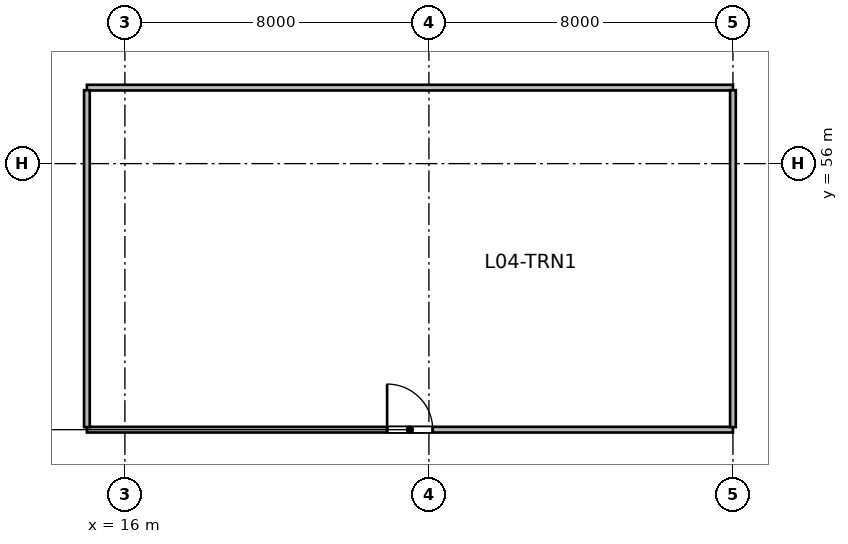
"""IFC4 building model, lengths in metres.
Left out: names, types, materials, properties, quantities, classifications, styles, units other than length and angle.
Written with IfcOpenShell. Run it as: python <this file> out.ifc"""

import sys

from ifc_helpers import new_model, si_unit, direction, frame, frame_2d, origin, place, context, subcontext, project, spatial, rectangle, extrude, source, transform, mapped, element, fill, save


model = new_model("IFC4")
c1 = context("Model", 3, precision=1e-05, world=origin(), true_north=direction((0.0, 1.0)))
c2 = subcontext(c1, "Body", "Model", "MODEL_VIEW")
j1 = project(units=[si_unit("LENGTHUNIT", "METRE"), si_unit("PLANEANGLEUNIT", "RADIAN")], contexts=[c1])
p1 = place(None, origin())
s1 = spatial("IfcSite", under=j1, at=p1, CompositionType="ELEMENT")
p2 = place(p1, origin())
s2 = spatial("IfcBuilding", under=s1, at=p2, CompositionType="ELEMENT")
p3 = place(p2, frame((0.0, 0.0, 24.0)))
s3 = spatial("IfcBuildingStorey", under=s2, at=p3, CompositionType="ELEMENT", Elevation=24.0)
m1 = source(origin(), c2, "Body", "SweptSolid", [
    extrude(rectangle(XDim=17.0, YDim=0.15, at=frame_2d((8.5, 0.0))), origin(), (0.0, 0.0, 1.0), 5.55),
])
p4 = place(p3, frame((15.0, 49.0, 0.0), z_axis=(0.0, 0.0, 1.0), x_axis=(1.0, 0.0, 0.0)))
e1 = element("IfcWall", 1, at=p4, inside=s3, PredefinedType="PARTITIONING", context=c2, shape_type="MappedRepresentation", body=[
    mapped(m1, transform((0.0, 0.0, 0.0), scale=1.0)),
])
p5 = place(p4, frame((7.9, 0.0, 0.0)))
e2 = element("IfcOpeningElement", 2, at=p5, cuts=e1, PredefinedType="OPENING", context=c2, shape_type="SweptSolid", body=[
    extrude(rectangle(XDim=1.2, YDim=2.15, at=frame_2d((0.6, 1.075))), frame((0.0, 0.085, 0.0), z_axis=(0.0, -1.0, 0.0), x_axis=(1.0, 0.0, 0.0)), (0.0, 0.0, 1.0), 0.17),
])
p6 = place(p3, frame((15.0, 58.0, 0.0), z_axis=(0.0, 0.0, 1.0), x_axis=(1.0, 0.0, 0.0)))
e3 = element("IfcWall", 3, at=p6, inside=s3, PredefinedType="PARTITIONING", context=c2, shape_type="MappedRepresentation", body=[
    mapped(m1, transform((0.0, 0.0, 0.0), scale=1.0)),
])
m2 = source(origin(), c2, "Body", "SweptSolid", [
    extrude(rectangle(XDim=8.865, YDim=0.15, at=frame_2d((4.433, 0.0))), origin(), (0.0, 0.0, 1.0), 5.55),
])
p7 = place(p3, frame((15.0, 49.067, 0.0), z_axis=(0.0, 0.0, 1.0), x_axis=(0.0, 1.0, 0.0)))
e4 = element("IfcWall", 4, at=p7, inside=s3, PredefinedType="PARTITIONING", context=c2, shape_type="MappedRepresentation", body=[
    mapped(m2, transform((0.0, 0.0, 0.0), scale=1.0)),
])
m3 = source(origin(), c2, "Body", "SweptSolid", [
    extrude(rectangle(XDim=8.865, YDim=0.15, at=frame_2d((4.433, 0.0))), origin(), (0.0, 0.0, 1.0), 2.66),
])
p8 = place(p3, frame((32.0, 49.067, 0.0), z_axis=(0.0, 0.0, 1.0), x_axis=(0.0, 1.0, 0.0)))
e5 = element("IfcWall", 5, at=p8, inside=s3, PredefinedType="PARTITIONING", context=c2, shape_type="MappedRepresentation", body=[
    mapped(m3, transform((0.0, 0.0, 0.0), scale=1.0)),
])
m4 = source(origin(), c2, "Body", "SweptSolid", [
    extrude(rectangle(XDim=1.2, YDim=2.15, at=frame_2d((0.6, 1.075))), frame((0.0, 0.025, 0.0), z_axis=(0.0, -1.0, 0.0), x_axis=(1.0, 0.0, 0.0)), (0.0, 0.0, 1.0), 0.05),
])
p9 = place(p5, origin())
e6 = element("IfcDoor", 6, at=p9, inside=s3, OperationType="SINGLE_SWING_LEFT", PredefinedType="DOOR", context=c2, shape_type="MappedRepresentation", body=[
    mapped(m4, transform((0.0, 0.0, 0.0), scale=1.0)),
])
fill(e2, e6)
save(model, sys.argv[1])
